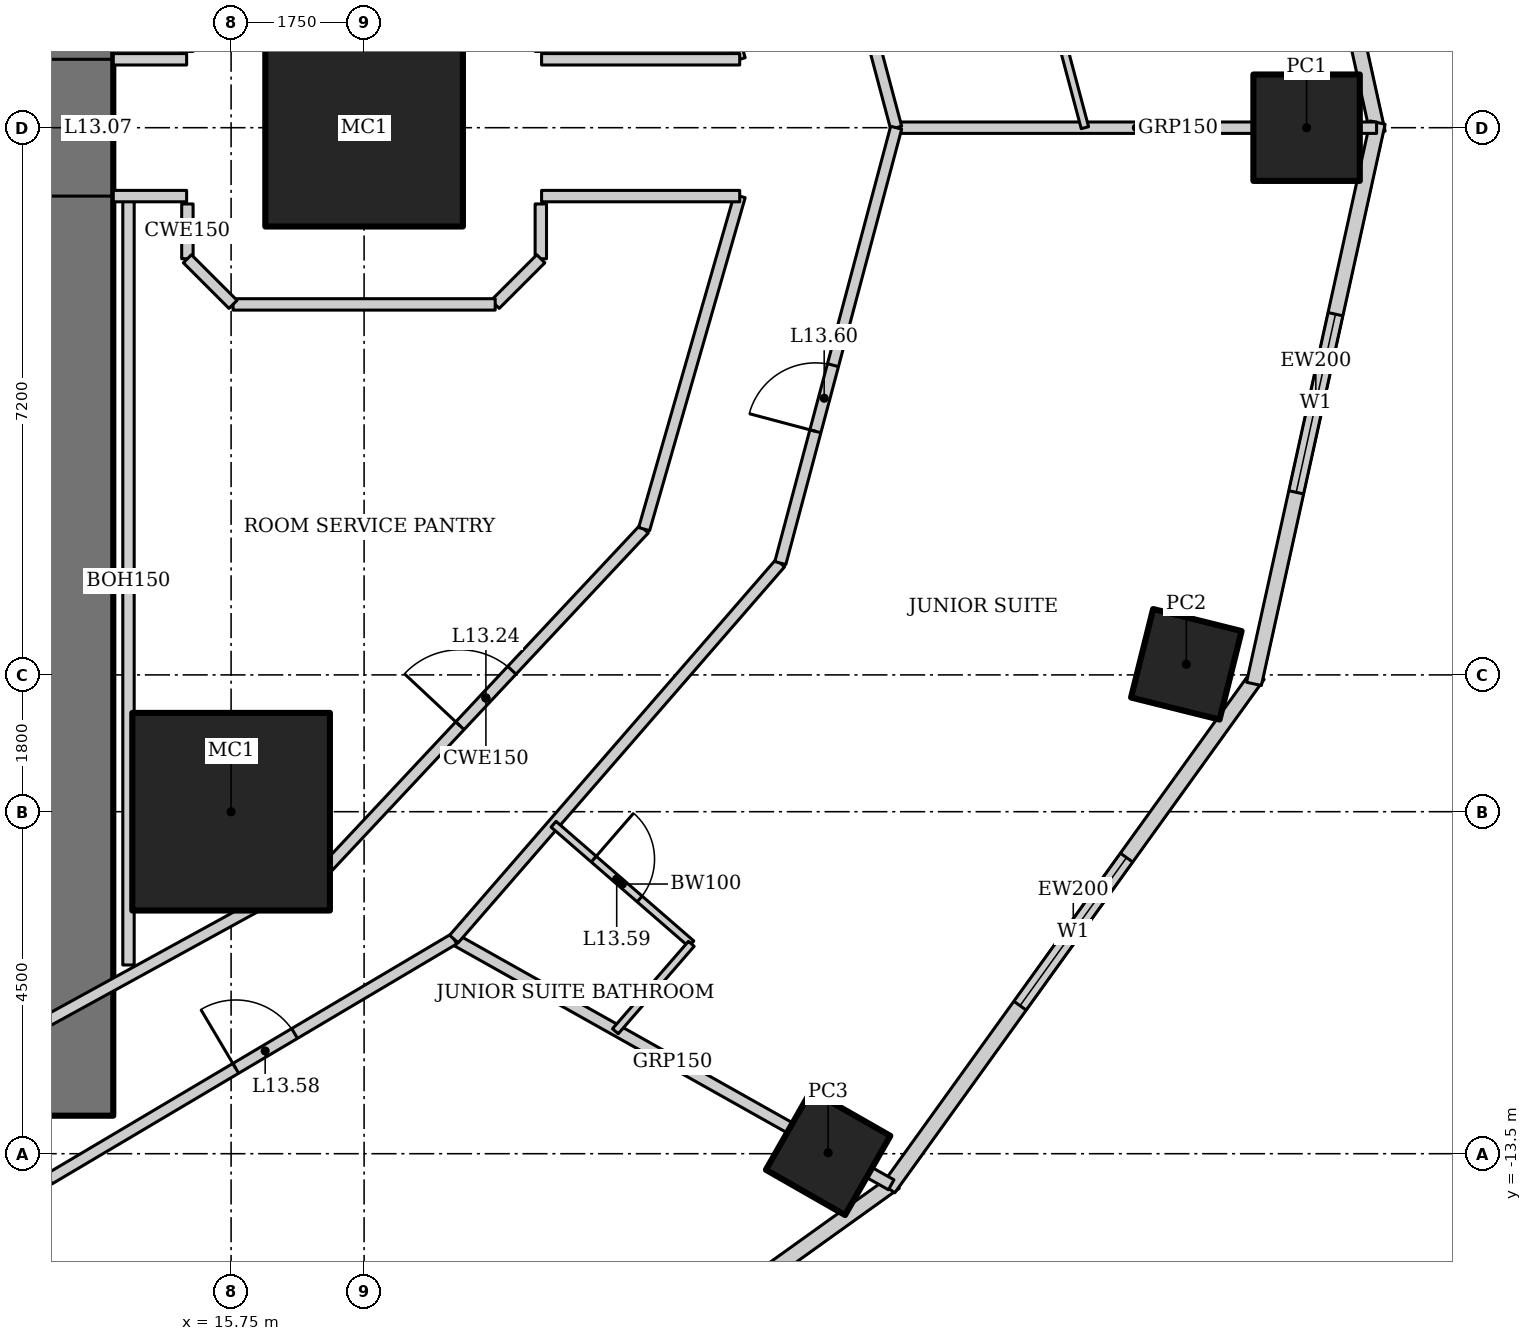
"""IFC4 building model, lengths in metres.
Left out: names, types, materials, properties, quantities, classifications, styles, units other than length and angle.
Written with IfcOpenShell. Run it as: python <this file> out.ifc"""

import sys

from ifc_helpers import new_model, si_unit, direction, frame, frame_2d, origin, origin_2d, place, context, subcontext, project, spatial, rectangle, hollow_rectangle, extrude, element, fill, save


model = new_model("IFC4")
c1 = context("Model", 3, precision=1e-05, world=origin(), true_north=direction((0.0, 1.0)))
c2 = subcontext(c1, "Body", "Model", "MODEL_VIEW")
j1 = project(units=[si_unit("LENGTHUNIT", "METRE"), si_unit("PLANEANGLEUNIT", "RADIAN")], contexts=[c1])
p1 = place(None, origin())
s1 = spatial("IfcSite", under=j1, at=p1, CompositionType="ELEMENT")
p2 = place(p1, origin())
s2 = spatial("IfcBuilding", under=s1, at=p2, CompositionType="ELEMENT")
p3 = place(p2, frame((0.0, 0.0, 62.2)))
s3 = spatial("IfcBuildingStorey", under=s2, at=p3, CompositionType="ELEMENT", Elevation=62.2)
for number, where, z_axis, x_axis in (
    (1, (17.5, 0.0, 0.0), (0.0, 0.0, 1.0), (1.0, 0.0, 0.0)),
    (2, (15.75, -9.0, 0.0), (0.0, 0.0, 1.0), (1.0, 0.0, 0.0)),
):
    element("IfcColumn", number, at=place(p3, frame(where, z_axis=z_axis, x_axis=x_axis)), inside=s3, PredefinedType="COLUMN", context=c2, shape_type="SweptSolid", body=[
        extrude(hollow_rectangle(XDim=2.6, YDim=2.6, WallThickness=0.13, at=origin_2d()), origin(), (0.0, 0.0, 1.0), 3.6),
    ])
p4 = place(p3, frame((29.9, 0.0, 0.0), z_axis=(0.0, 0.0, 1.0), x_axis=(1.0, 0.0, 0.0)))
e3 = element("IfcColumn", 3, at=p4, inside=s3, PredefinedType="COLUMN", context=c2, shape_type="SweptSolid", body=[
    extrude(hollow_rectangle(XDim=1.4, YDim=1.4, WallThickness=0.1, at=origin_2d()), origin(), (0.0, 0.0, 1.0), 3.6),
])
p5 = place(p3, frame((23.605, -13.489, 0.0), z_axis=(0.0, 0.0, 1.0), x_axis=(0.496139221777, 0.86824298017, 0.0)))
e4 = element("IfcColumn", 4, at=p5, inside=s3, PredefinedType="COLUMN", context=c2, shape_type="SweptSolid", body=[
    extrude(hollow_rectangle(XDim=1.2, YDim=1.2, WallThickness=0.12, at=origin_2d()), origin(), (0.0, 0.0, 1.0), 3.6),
])
p6 = place(p3, frame((28.318, -7.06, 0.0), z_axis=(0.0, 0.0, 1.0), x_axis=(0.2419218956, 0.970295726276, 0.0)))
e5 = element("IfcColumn", 5, at=p6, inside=s3, PredefinedType="COLUMN", context=c2, shape_type="SweptSolid", body=[
    extrude(hollow_rectangle(XDim=1.2, YDim=1.2, WallThickness=0.1, at=origin_2d()), origin(), (0.0, 0.0, 1.0), 3.6),
])
p7 = place(p3, frame((13.2, -13.0, 0.0), z_axis=(0.0, 0.0, 1.0), x_axis=(0.0, 1.0, 0.0)))
e6 = element("IfcWall", 6, at=p7, inside=s3, PredefinedType="SHEAR", context=c2, shape_type="SweptSolid", body=[
    extrude(rectangle(XDim=26.0, YDim=2.0, at=frame_2d((13.0, 0.0))), origin(), (0.0, 0.0, 1.0), 3.6),
])
p8 = place(p7, frame((12.1, 0.0, 0.0)))
e7 = element("IfcOpeningElement", 7, at=p8, cuts=e6, PredefinedType="OPENING", context=c2, shape_type="SweptSolid", body=[
    extrude(rectangle(XDim=1.8, YDim=2.1, at=frame_2d((0.9, 1.05))), frame((0.0, 1.01, 0.0), z_axis=(0.0, -1.0, 0.0), x_axis=(1.0, 0.0, 0.0)), (0.0, 0.0, 1.0), 2.02),
])
p9 = place(p3, frame((30.835, -0.067, 0.0), z_axis=(0.0, 0.0, 1.0), x_axis=(-0.215238065514, 0.976561608478, 0.0)))
e8 = element("IfcWall", 8, at=p9, inside=s3, PredefinedType="SOLIDWALL", context=c2, shape_type="SweptSolid", body=[
    extrude(rectangle(XDim=7.562, YDim=0.2, at=frame_2d((3.781, 0.0))), origin(), (0.0, 0.0, 1.0), 3.45),
])
p10 = place(p9, frame((2.581, 0.0, 0.5)))
e9 = element("IfcOpeningElement", 9, at=p10, cuts=e8, PredefinedType="OPENING", context=c2, shape_type="SweptSolid", body=[
    extrude(rectangle(XDim=2.4, YDim=2.2, at=frame_2d((1.2, 1.1))), frame((0.0, 0.11, 0.0), z_axis=(0.0, -1.0, 0.0), x_axis=(1.0, 0.0, 0.0)), (0.0, 0.0, 1.0), 0.22),
])
p11 = place(p3, frame((17.929, -18.572, 0.0), z_axis=(0.0, 0.0, 1.0), x_axis=(0.812791321576, 0.582554948112, 0.0)))
e10 = element("IfcWall", 10, at=p11, inside=s3, PredefinedType="SOLIDWALL", context=c2, shape_type="SweptSolid", body=[
    extrude(rectangle(XDim=8.063, YDim=0.2, at=frame_2d((4.032, 0.0))), origin(), (0.0, 0.0, 1.0), 3.45),
])
p12 = place(p11, frame((2.832, 0.0, 0.5)))
e11 = element("IfcOpeningElement", 11, at=p12, cuts=e10, PredefinedType="OPENING", context=c2, shape_type="SweptSolid", body=[
    extrude(rectangle(XDim=2.4, YDim=2.2, at=frame_2d((1.2, 1.1))), frame((0.0, 0.11, 0.0), z_axis=(0.0, -1.0, 0.0), x_axis=(1.0, 0.0, 0.0)), (0.0, 0.0, 1.0), 0.22),
])
p13 = place(p3, frame((24.4, -13.957, 0.0), z_axis=(0.0, 0.0, 1.0), x_axis=(0.583937613703, 0.811798536155, 0.0)))
e12 = element("IfcWall", 12, at=p13, inside=s3, PredefinedType="SOLIDWALL", context=c2, shape_type="SweptSolid", body=[
    extrude(rectangle(XDim=8.323, YDim=0.2, at=frame_2d((4.162, 0.0))), origin(), (0.0, 0.0, 1.0), 3.45),
])
p14 = place(p13, frame((2.961, 0.0, 0.5)))
e13 = element("IfcOpeningElement", 13, at=p14, cuts=e12, PredefinedType="OPENING", context=c2, shape_type="SweptSolid", body=[
    extrude(rectangle(XDim=2.4, YDim=2.2, at=frame_2d((1.2, 1.1))), frame((0.0, 0.11, 0.0), z_axis=(0.0, -1.0, 0.0), x_axis=(1.0, 0.0, 0.0)), (0.0, 0.0, 1.0), 0.22),
])
p15 = place(p3, frame((29.208, -7.318, 0.0), z_axis=(0.0, 0.0, 1.0), x_axis=(0.215238065514, 0.976561608478, 0.0)))
e14 = element("IfcWall", 14, at=p15, inside=s3, PredefinedType="SOLIDWALL", context=c2, shape_type="SweptSolid", body=[
    extrude(rectangle(XDim=7.562, YDim=0.2, at=frame_2d((3.781, 0.0))), origin(), (0.0, 0.0, 1.0), 3.45),
])
p16 = place(p15, frame((2.581, 0.0, 0.5)))
e15 = element("IfcOpeningElement", 15, at=p16, cuts=e14, PredefinedType="OPENING", context=c2, shape_type="SweptSolid", body=[
    extrude(rectangle(XDim=2.4, YDim=2.2, at=frame_2d((1.2, 1.1))), frame((0.0, 0.11, 0.0), z_axis=(0.0, -1.0, 0.0), x_axis=(1.0, 0.0, 0.0)), (0.0, 0.0, 1.0), 0.22),
])
p17 = place(p3, frame((30.821, 0.0, 0.0), z_axis=(0.0, 0.0, 1.0), x_axis=(-1.0, 0.0, 0.0)))
e16 = element("IfcWall", 16, at=p17, inside=s3, PredefinedType="PARTITIONING", context=c2, shape_type="SweptSolid", body=[
    extrude(rectangle(XDim=6.321, YDim=0.15, at=frame_2d((3.16, 0.0))), origin(), (0.0, 0.0, 1.0), 2.528),
])
p18 = place(p3, frame((24.435, -13.909, 0.0), z_axis=(0.0, 0.0, 1.0), x_axis=(-0.871747379892, 0.489955616001, 0.0)))
e17 = element("IfcWall", 17, at=p18, inside=s3, PredefinedType="PARTITIONING", context=c2, shape_type="SweptSolid", body=[
    extrude(rectangle(XDim=6.6, YDim=0.15, at=frame_2d((3.3, 0.0))), origin(), (0.0, 0.0, 1.0), 2.693),
])
p19 = place(p3, frame((24.5, 0.0, 0.0), z_axis=(0.0, 0.0, 1.0), x_axis=(-0.257083265334, 0.966389256296, 0.0)))
e18 = element("IfcWall", 18, at=p19, inside=s3, PredefinedType="PARTITIONING", context=c2, shape_type="SweptSolid", body=[
    extrude(rectangle(XDim=5.928, YDim=0.15, at=frame_2d((2.964, 0.0))), origin(), (0.0, 0.0, 1.0), 3.45),
])
p20 = place(p3, frame((13.357, -13.832, 0.0), z_axis=(0.0, 0.0, 1.0), x_axis=(0.860147339762, 0.510045639036, 0.0)))
e19 = element("IfcWall", 19, at=p20, inside=s3, PredefinedType="PARTITIONING", context=c2, shape_type="SweptSolid", body=[
    extrude(rectangle(XDim=6.19, YDim=0.15, at=frame_2d((3.095, 0.0))), origin(), (0.0, 0.0, 1.0), 3.45),
])
p21 = place(p20, frame((2.853, 0.0, 0.0)))
e20 = element("IfcOpeningElement", 20, at=p21, cuts=e19, PredefinedType="OPENING", context=c2, shape_type="SweptSolid", body=[
    extrude(rectangle(XDim=0.9, YDim=2.1, at=frame_2d((0.45, 1.05))), frame((0.0, 0.085, 0.0), z_axis=(0.0, -1.0, 0.0), x_axis=(1.0, 0.0, 0.0)), (0.0, 0.0, 1.0), 0.17),
])
p22 = place(p3, frame((18.681, -10.675, 0.0), z_axis=(0.0, 0.0, 1.0), x_axis=(0.655599989166, 0.755108372491, 0.0)))
e21 = element("IfcWall", 21, at=p22, inside=s3, PredefinedType="PARTITIONING", context=c2, shape_type="SweptSolid", body=[
    extrude(rectangle(XDim=6.551, YDim=0.15, at=frame_2d((3.275, 0.0))), origin(), (0.0, 0.0, 1.0), 3.45),
])
p23 = place(p3, frame((22.976, -5.729, 0.0), z_axis=(0.0, 0.0, 1.0), x_axis=(0.257083265334, 0.966389256296, 0.0)))
e22 = element("IfcWall", 22, at=p23, inside=s3, PredefinedType="PARTITIONING", context=c2, shape_type="SweptSolid", body=[
    extrude(rectangle(XDim=5.928, YDim=0.15, at=frame_2d((2.964, 0.0))), origin(), (0.0, 0.0, 1.0), 3.45),
])
p24 = place(p23, frame((1.794, 0.0, 0.0)))
e23 = element("IfcOpeningElement", 23, at=p24, cuts=e22, PredefinedType="OPENING", context=c2, shape_type="SweptSolid", body=[
    extrude(rectangle(XDim=0.9, YDim=2.1, at=frame_2d((0.45, 1.05))), frame((0.0, 0.085, 0.0), z_axis=(0.0, -1.0, 0.0), x_axis=(1.0, 0.0, 0.0)), (0.0, 0.0, 1.0), 0.17),
])
p25 = place(p3, frame((22.442, 0.9, 0.0), z_axis=(0.0, 0.0, 1.0), x_axis=(-0.27585972825, 0.961197903831, 0.0)))
e24 = element("IfcWall", 24, at=p25, inside=s3, PredefinedType="PARTITIONING", context=c2, shape_type="SweptSolid", body=[
    extrude(rectangle(XDim=4.559, YDim=0.15, at=frame_2d((2.279, 0.0))), origin(), (0.0, 0.0, 1.0), 3.45),
])
p26 = place(p3, frame((12.036, -12.464, 0.0), z_axis=(0.0, 0.0, 1.0), x_axis=(0.876522084062, 0.481361647986, 0.0)))
e25 = element("IfcWall", 25, at=p26, inside=s3, PredefinedType="PARTITIONING", context=c2, shape_type="SweptSolid", body=[
    extrude(rectangle(XDim=5.687, YDim=0.15, at=frame_2d((2.844, 0.0))), origin(), (0.0, 0.0, 1.0), 3.45),
])
p27 = place(p3, frame((17.021, -9.726, 0.0), z_axis=(0.0, 0.0, 1.0), x_axis=(0.68365836236, 0.729802194828, 0.0)))
e26 = element("IfcWall", 26, at=p27, inside=s3, PredefinedType="PARTITIONING", context=c2, shape_type="SweptSolid", body=[
    extrude(rectangle(XDim=6.09, YDim=0.15, at=frame_2d((3.045, 0.0))), origin(), (0.0, 0.0, 1.0), 3.45),
])
p28 = place(p27, frame((2.545, 0.0, 0.0)))
e27 = element("IfcOpeningElement", 27, at=p28, cuts=e26, PredefinedType="OPENING", context=c2, shape_type="SweptSolid", body=[
    extrude(rectangle(XDim=1.0, YDim=2.1, at=frame_2d((0.5, 1.05))), frame((0.0, 0.085, 0.0), z_axis=(0.0, -1.0, 0.0), x_axis=(1.0, 0.0, 0.0)), (0.0, 0.0, 1.0), 0.17),
])
p29 = place(p3, frame((21.184, -5.282, 0.0), z_axis=(0.0, 0.0, 1.0), x_axis=(0.27585972825, 0.961197903831, 0.0)))
e28 = element("IfcWall", 28, at=p29, inside=s3, PredefinedType="PARTITIONING", context=c2, shape_type="SweptSolid", body=[
    extrude(rectangle(XDim=4.559, YDim=0.15, at=frame_2d((2.279, 0.0))), origin(), (0.0, 0.0, 1.0), 3.45),
])
p30 = place(p3, frame((14.4, -11.017, 0.0), z_axis=(0.0, 0.0, 1.0), x_axis=(0.0, 1.0, 0.0)))
e29 = element("IfcWall", 29, at=p30, inside=s3, PredefinedType="PARTITIONING", context=c2, shape_type="SweptSolid", body=[
    extrude(rectangle(XDim=10.117, YDim=0.15, at=frame_2d((5.059, 0.0))), origin(), (0.0, 0.0, 1.0), 3.45),
])
p31 = place(p3, frame((26.305, 2.55, 0.0), z_axis=(0.0, 0.0, 1.0), x_axis=(0.257052122515, -0.966397540513, 0.0)))
e30 = element("IfcWall", 30, at=p31, inside=s3, PredefinedType="PARTITIONING", context=c2, shape_type="SweptSolid", body=[
    extrude(rectangle(XDim=2.638, YDim=0.1, at=frame_2d((1.319, 0.0))), origin(), (0.0, 0.0, 1.0), 3.45),
])
p32 = place(p3, frame((19.993, -9.165, 0.0), z_axis=(0.0, 0.0, 1.0), x_axis=(0.755098052661, -0.655611875172, 0.0)))
e31 = element("IfcWall", 31, at=p32, inside=s3, PredefinedType="PARTITIONING", context=c2, shape_type="SweptSolid", body=[
    extrude(rectangle(XDim=2.4, YDim=0.1, at=frame_2d((1.2, 0.0))), origin(), (0.0, 0.0, 1.0), 3.45),
])
p33 = place(p32, frame((0.7, 0.0, 0.0)))
e32 = element("IfcOpeningElement", 32, at=p33, cuts=e31, PredefinedType="OPENING", context=c2, shape_type="SweptSolid", body=[
    extrude(rectangle(XDim=0.8, YDim=2.1, at=frame_2d((0.4, 1.05))), frame((0.0, 0.06, 0.0), z_axis=(0.0, -1.0, 0.0), x_axis=(1.0, 0.0, 0.0)), (0.0, 0.0, 1.0), 0.12),
])
p34 = place(p3, frame((21.805, -10.738, 0.0), z_axis=(0.0, 0.0, 1.0), x_axis=(-0.655528024617, -0.755170847518, 0.0)))
e33 = element("IfcWall", 33, at=p34, inside=s3, PredefinedType="PARTITIONING", context=c2, shape_type="SweptSolid", body=[
    extrude(rectangle(XDim=1.524, YDim=0.1, at=frame_2d((0.762, 0.0))), origin(), (0.0, 0.0, 1.0), 3.45),
])
p35 = place(p3, frame((14.2, -0.9, 0.0), z_axis=(0.0, 0.0, 1.0), x_axis=(1.0, 0.0, 0.0)))
e34 = element("IfcWall", 34, at=p35, inside=s3, PredefinedType="PARTITIONING", context=c2, shape_type="SweptSolid", body=[
    extrude(rectangle(XDim=0.965, YDim=0.15, at=frame_2d((0.482, 0.0))), origin(), (0.0, 0.0, 1.0), 3.45),
])
p36 = place(p3, frame((19.835, -0.9, 0.0), z_axis=(0.0, 0.0, 1.0), x_axis=(1.0, 0.0, 0.0)))
e35 = element("IfcWall", 35, at=p36, inside=s3, PredefinedType="PARTITIONING", context=c2, shape_type="SweptSolid", body=[
    extrude(rectangle(XDim=2.607, YDim=0.15, at=frame_2d((1.303, 0.0))), origin(), (0.0, 0.0, 1.0), 3.45),
])
p37 = place(p3, frame((14.2, 0.9, 0.0), z_axis=(0.0, 0.0, 1.0), x_axis=(1.0, 0.0, 0.0)))
e36 = element("IfcWall", 36, at=p37, inside=s3, PredefinedType="PARTITIONING", context=c2, shape_type="SweptSolid", body=[
    extrude(rectangle(XDim=0.965, YDim=0.15, at=frame_2d((0.482, 0.0))), origin(), (0.0, 0.0, 1.0), 3.45),
])
p38 = place(p3, frame((19.835, 0.9, 0.0), z_axis=(0.0, 0.0, 1.0), x_axis=(1.0, 0.0, 0.0)))
e37 = element("IfcWall", 37, at=p38, inside=s3, PredefinedType="PARTITIONING", context=c2, shape_type="SweptSolid", body=[
    extrude(rectangle(XDim=2.607, YDim=0.15, at=frame_2d((1.303, 0.0))), origin(), (0.0, 0.0, 1.0), 3.45),
])
for number, where, z_axis, x_axis in (
    (38, (15.175, -1.725, 0.0), (0.0, 0.0, 1.0), (0.0, 1.0, 0.0)),
    (39, (19.825, -1.003, 0.0), (0.0, 0.0, 1.0), (0.0, -1.0, 0.0)),
):
    element("IfcWall", number, at=place(p3, frame(where, z_axis=z_axis, x_axis=x_axis)), inside=s3, PredefinedType="PARTITIONING", context=c2, shape_type="SweptSolid", body=[
        extrude(rectangle(XDim=0.721, YDim=0.15, at=frame_2d((0.361, 0.0))), origin(), (0.0, 0.0, 1.0), 3.45),
    ])
p39 = place(p3, frame((19.825, -1.725, 0.0), z_axis=(0.0, 0.0, 1.0), x_axis=(-0.707106781187, -0.707106781187, 0.0)))
e40 = element("IfcWall", 40, at=p39, inside=s3, PredefinedType="PARTITIONING", context=c2, shape_type="SweptSolid", body=[
    extrude(rectangle(XDim=0.849, YDim=0.15, at=frame_2d((0.425, 0.0))), origin(), (0.0, 0.0, 1.0), 3.45),
])
p40 = place(p3, frame((19.225, -2.325, 0.0), z_axis=(0.0, 0.0, 1.0), x_axis=(-1.0, 0.0, 0.0)))
e41 = element("IfcWall", 41, at=p40, inside=s3, PredefinedType="PARTITIONING", context=c2, shape_type="SweptSolid", body=[
    extrude(rectangle(XDim=3.449, YDim=0.15, at=frame_2d((1.725, 0.0))), origin(), (0.0, 0.0, 1.0), 3.45),
])
p41 = place(p3, frame((15.775, -2.325, 0.0), z_axis=(0.0, 0.0, 1.0), x_axis=(-0.707106781187, 0.707106781187, 0.0)))
e42 = element("IfcWall", 42, at=p41, inside=s3, PredefinedType="PARTITIONING", context=c2, shape_type="SweptSolid", body=[
    extrude(rectangle(XDim=0.849, YDim=0.15, at=frame_2d((0.425, 0.0))), origin(), (0.0, 0.0, 1.0), 3.45),
])
p42 = place(p14, origin())
e43 = element("IfcWindow", 43, at=p42, inside=s3, PartitioningType="SINGLE_PANEL", PredefinedType="WINDOW", context=c2, shape_type="SweptSolid", body=[
    extrude(rectangle(XDim=2.4, YDim=2.2, at=frame_2d((1.2, 1.1))), frame((0.0, 0.03, 0.0), z_axis=(0.0, -1.0, 0.0), x_axis=(1.0, 0.0, 0.0)), (0.0, 0.0, 1.0), 0.06),
])
fill(e13, e43)
p43 = place(p16, origin())
e44 = element("IfcWindow", 44, at=p43, inside=s3, PartitioningType="SINGLE_PANEL", PredefinedType="WINDOW", context=c2, shape_type="SweptSolid", body=[
    extrude(rectangle(XDim=2.4, YDim=2.2, at=frame_2d((1.2, 1.1))), frame((0.0, 0.03, 0.0), z_axis=(0.0, -1.0, 0.0), x_axis=(1.0, 0.0, 0.0)), (0.0, 0.0, 1.0), 0.06),
])
fill(e15, e44)
p44 = place(p28, origin())
e45 = element("IfcDoor", 45, at=p44, inside=s3, OperationType="SINGLE_SWING_LEFT", PredefinedType="DOOR", context=c2, shape_type="SweptSolid", body=[
    extrude(rectangle(XDim=1.0, YDim=2.1, at=frame_2d((0.5, 1.05))), frame((0.0, 0.025, 0.0), z_axis=(0.0, -1.0, 0.0), x_axis=(1.0, 0.0, 0.0)), (0.0, 0.0, 1.0), 0.05),
])
fill(e27, e45)
p45 = place(p21, origin())
e46 = element("IfcDoor", 46, at=p45, inside=s3, OperationType="SINGLE_SWING_LEFT", PredefinedType="DOOR", context=c2, shape_type="SweptSolid", body=[
    extrude(rectangle(XDim=0.9, YDim=2.1, at=frame_2d((0.45, 1.05))), frame((0.0, 0.025, 0.0), z_axis=(0.0, -1.0, 0.0), x_axis=(1.0, 0.0, 0.0)), (0.0, 0.0, 1.0), 0.05),
])
fill(e20, e46)
p46 = place(p33, origin())
e47 = element("IfcDoor", 47, at=p46, inside=s3, OperationType="SINGLE_SWING_LEFT", PredefinedType="DOOR", context=c2, shape_type="SweptSolid", body=[
    extrude(rectangle(XDim=0.8, YDim=2.1, at=frame_2d((0.4, 1.05))), frame((0.0, 0.025, 0.0), z_axis=(0.0, -1.0, 0.0), x_axis=(1.0, 0.0, 0.0)), (0.0, 0.0, 1.0), 0.05),
])
fill(e32, e47)
p47 = place(p24, origin())
e48 = element("IfcDoor", 48, at=p47, inside=s3, OperationType="SINGLE_SWING_LEFT", PredefinedType="DOOR", context=c2, shape_type="SweptSolid", body=[
    extrude(rectangle(XDim=0.9, YDim=2.1, at=frame_2d((0.45, 1.05))), frame((0.0, 0.025, 0.0), z_axis=(0.0, -1.0, 0.0), x_axis=(1.0, 0.0, 0.0)), (0.0, 0.0, 1.0), 0.05),
])
fill(e23, e48)
save(model, sys.argv[1])
